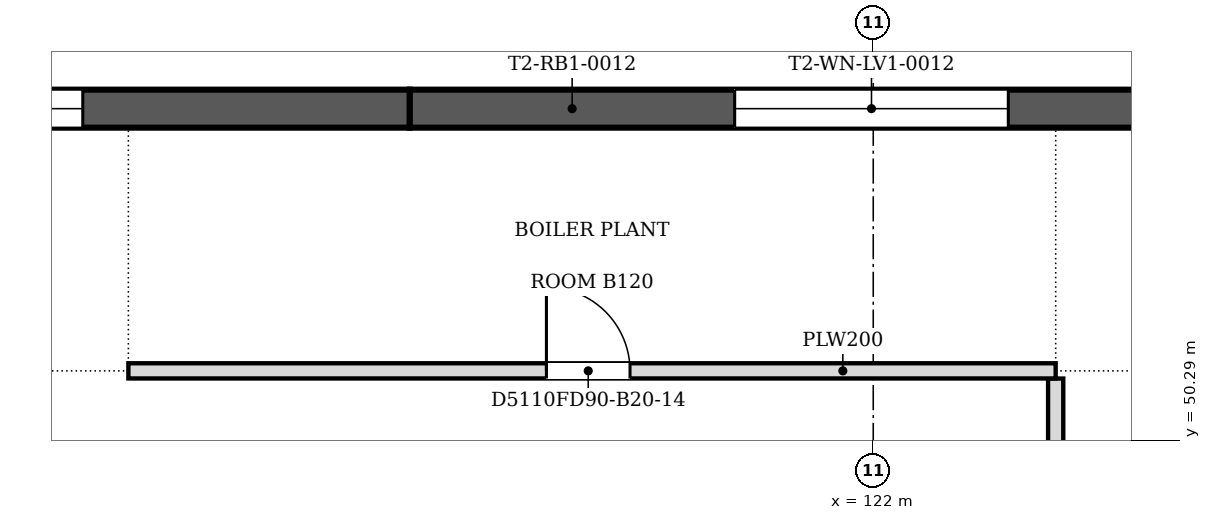
"""IFC4 building model, lengths in metres.
Left out: names, types, materials, properties, quantities, classifications, styles, units other than length and angle.
Written with IfcOpenShell. Run it as: python <this file> out.ifc"""

import sys

from ifc_helpers import new_model, si_unit, direction, frame, frame_2d, origin, place, context, subcontext, project, spatial, polyline, rectangle, outline, extrude, faceted_brep, source, transform, mapped, element, fill, save


model = new_model("IFC4")
c1 = context("Model", 3, precision=1e-05, world=origin(), true_north=direction((0.0, 1.0)))
c2 = subcontext(c1, "Body", "Model", "MODEL_VIEW")
j1 = project(units=[si_unit("LENGTHUNIT", "METRE"), si_unit("PLANEANGLEUNIT", "RADIAN")], contexts=[c1])
p1 = place(None, origin())
s1 = spatial("IfcSite", under=j1, at=p1, CompositionType="ELEMENT")
p2 = place(p1, origin())
s2 = spatial("IfcBuilding", under=s1, at=p2, CompositionType="ELEMENT")
p3 = place(p2, frame((0.0, 0.0, 63.8)))
s3 = spatial("IfcBuildingStorey", under=s2, at=p3, CompositionType="ELEMENT", Elevation=63.8)
m1 = source(origin(), c2, "Body", "Brep", [
    faceted_brep([(0.0, -0.25, 0.0), (12.154, -0.25, 0.0), (12.154, -0.25, 4.8), (0.0, -0.25, 4.8), (0.047, 0.25, 4.8), (12.154, 0.25, 4.8), (12.154, 0.25, 0.0), (0.047, 0.25, 0.0), (0.0, 0.0, 0.0), (0.0, 0.0, 4.8)], [[[0, 1, 2, 3]], [[4, 5, 6, 7]], [[7, 6, 1, 0, 8]], [[5, 4, 9, 3, 2]], [[8, 0, 3, 9]], [[7, 8, 9, 4]], [[1, 6, 5, 2]]]),
])
p4 = place(p3, frame((128.053, 54.65, 0.0), z_axis=(0.0, 0.0, 1.0), x_axis=(-1.0, 0.0, 0.0)))
e1 = element("IfcWall", 1, at=p4, inside=s3, PredefinedType="SOLIDWALL", context=c2, shape_type="MappedRepresentation", body=[
    mapped(m1, transform((0.0, 0.0, 0.0), scale=1.0)),
])
m2 = source(origin(), c2, "Body", "SweptSolid", [
    extrude(outline(polyline([(4.277, 0.8), (7.877, 0.8), (7.877, 4.0), (4.277, 4.0), (4.277, 0.8)])), frame((0.0, 0.26, 0.0), z_axis=(0.0, -1.0, 0.0), x_axis=(1.0, 0.0, 0.0)), (0.0, 0.0, 1.0), 0.52),
])
p5 = place(p4, origin())
e2 = element("IfcOpeningElement", 2, at=p5, cuts=e1, PredefinedType="OPENING", context=c2, shape_type="MappedRepresentation", body=[
    mapped(m2, transform((0.0, 0.0, 0.0), scale=1.0)),
])
m3 = source(origin(), c2, "Body", "SweptSolid", [
    extrude(outline(polyline([(0.0, 0.0), (12.2, 0.0), (12.2, 4.8), (0.0, 4.8), (0.0, 0.0)])), frame((0.0, 0.25, 0.0), z_axis=(0.0, -1.0, 0.0), x_axis=(1.0, 0.0, 0.0)), (0.0, 0.0, 1.0), 0.5),
])
p6 = place(p3, frame((115.9, 54.65, 0.0), z_axis=(0.0, 0.0, 1.0), x_axis=(-1.0, 0.0, 0.0)))
e3 = element("IfcWall", 3, at=p6, inside=s3, PredefinedType="SOLIDWALL", context=c2, shape_type="MappedRepresentation", body=[
    mapped(m3, transform((0.0, 0.0, 0.0), scale=1.0)),
])
m4 = source(origin(), c2, "Body", "SweptSolid", [
    extrude(outline(polyline([(4.3, 0.8), (7.9, 0.8), (7.9, 4.0), (4.3, 4.0), (4.3, 0.8)])), frame((0.0, 0.26, 0.0), z_axis=(0.0, -1.0, 0.0), x_axis=(1.0, 0.0, 0.0)), (0.0, 0.0, 1.0), 0.52),
])
p7 = place(p6, origin())
e4 = element("IfcOpeningElement", 4, at=p7, cuts=e3, PredefinedType="OPENING", context=c2, shape_type="MappedRepresentation", body=[
    mapped(m4, transform((0.0, 0.0, 0.0), scale=1.0)),
])
p8 = place(p3, frame((124.4, 51.099, 0.0), z_axis=(0.0, 0.0, 1.0), x_axis=(0.0, -1.0, 0.0)))
e5 = element("IfcWall", 5, at=p8, inside=s3, PredefinedType="PARTITIONING", context=c2, shape_type="SweptSolid", body=[
    extrude(rectangle(XDim=4.949, YDim=0.2, at=frame_2d((2.475, 0.0))), origin(), (0.0, 0.0, 1.0), 4.067),
])
m5 = source(origin(), c2, "Body", "SweptSolid", [
    extrude(rectangle(XDim=1.1, YDim=2.1, at=frame_2d((0.55, 1.05))), frame((0.0, 0.11, 0.0), z_axis=(0.0, -1.0, 0.0), x_axis=(1.0, 0.0, 0.0)), (0.0, 0.0, 1.0), 0.22),
])
p9 = place(p8, frame((1.949, 0.0, 0.0)))
e6 = element("IfcOpeningElement", 6, at=p9, cuts=e5, PredefinedType="OPENING", context=c2, shape_type="MappedRepresentation", body=[
    mapped(m5, transform((0.0, 0.0, 0.0), scale=1.0)),
])
p10 = place(p3, frame((112.2, 51.2, 0.0), z_axis=(0.0, 0.0, 1.0), x_axis=(1.0, 0.0, 0.0)))
e7 = element("IfcWall", 7, at=p10, inside=s3, PredefinedType="PARTITIONING", context=c2, shape_type="SweptSolid", body=[
    extrude(rectangle(XDim=12.2, YDim=0.2, at=frame_2d((6.1, 0.0))), origin(), (0.0, 0.0, 1.0), 4.067),
])
p11 = place(p10, frame((5.5, 0.0, 0.0)))
e8 = element("IfcOpeningElement", 8, at=p11, cuts=e7, PredefinedType="OPENING", context=c2, shape_type="MappedRepresentation", body=[
    mapped(m5, transform((0.0, 0.0, 0.0), scale=1.0)),
])
m6 = source(origin(), c2, "Body", "SweptSolid", [
    extrude(outline(polyline([(4.277, 0.8), (7.877, 0.8), (7.877, 4.0), (4.277, 4.0), (4.277, 0.8)])), frame((0.0, 0.03, 0.0), z_axis=(0.0, -1.0, 0.0), x_axis=(1.0, 0.0, 0.0)), (0.0, 0.0, 1.0), 0.06),
])
p12 = place(p5, origin())
e9 = element("IfcWindow", 9, at=p12, inside=s3, PartitioningType="USERDEFINED", PredefinedType="WINDOW", context=c2, shape_type="MappedRepresentation", body=[
    mapped(m6, transform((0.0, 0.0, 0.0), scale=1.0)),
])
fill(e2, e9)
m7 = source(origin(), c2, "Body", "SweptSolid", [
    extrude(outline(polyline([(4.3, 0.8), (7.9, 0.8), (7.9, 4.0), (4.3, 4.0), (4.3, 0.8)])), frame((0.0, 0.03, 0.0), z_axis=(0.0, -1.0, 0.0), x_axis=(1.0, 0.0, 0.0)), (0.0, 0.0, 1.0), 0.06),
])
p13 = place(p7, origin())
e10 = element("IfcWindow", 10, at=p13, inside=s3, PartitioningType="USERDEFINED", PredefinedType="WINDOW", context=c2, shape_type="MappedRepresentation", body=[
    mapped(m7, transform((0.0, 0.0, 0.0), scale=1.0)),
])
fill(e4, e10)
m8 = source(origin(), c2, "Body", "SweptSolid", [
    extrude(rectangle(XDim=1.1, YDim=2.1, at=frame_2d((0.55, 1.05))), frame((0.0, 0.025, 0.0), z_axis=(0.0, -1.0, 0.0), x_axis=(1.0, 0.0, 0.0)), (0.0, 0.0, 1.0), 0.05),
])
p14 = place(p11, origin())
e11 = element("IfcDoor", 11, at=p14, inside=s3, OperationType="SINGLE_SWING_LEFT", PredefinedType="DOOR", context=c2, shape_type="MappedRepresentation", body=[
    mapped(m8, transform((0.0, 0.0, 0.0), scale=1.0)),
])
fill(e8, e11)
save(model, sys.argv[1])
